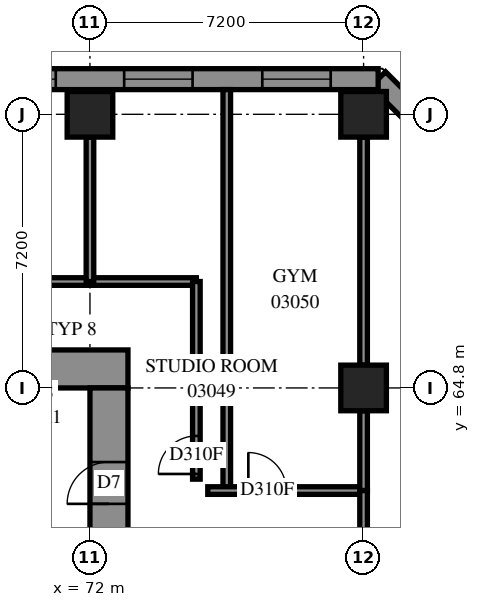
"""IFC4 building model, lengths in metres.
Left out: names, types, materials, properties, quantities, classifications, styles, units other than length and angle.
Written with IfcOpenShell. Run it as: python <this file> out.ifc"""

import sys

from ifc_helpers import new_model, si_unit, direction, frame, frame_2d, origin, origin_2d, place, context, subcontext, project, spatial, polyline, rectangle, outline, extrude, element, fill, save


model = new_model("IFC4")
c1 = context("Model", 3, precision=1e-05, world=origin(), true_north=direction((0.0, 1.0)))
c2 = subcontext(c1, "Body", "Model", "MODEL_VIEW")
j1 = project(units=[si_unit("LENGTHUNIT", "METRE"), si_unit("PLANEANGLEUNIT", "RADIAN")], contexts=[c1])
p1 = place(None, origin())
s1 = spatial("IfcSite", under=j1, at=p1, CompositionType="ELEMENT")
p2 = place(p1, origin())
s2 = spatial("IfcBuilding", under=s1, at=p2, CompositionType="ELEMENT")
p3 = place(p2, frame((0.0, 0.0, 14.4)))
s3 = spatial("IfcBuildingStorey", under=s2, at=p3, CompositionType="ELEMENT", Elevation=14.4)
for number, where, z_axis, x_axis in (
    (1, (72.0, 72.0, 0.0), (0.0, 0.0, 1.0), (1.0, 0.0, 0.0)),
    (2, (79.2, 64.8, 0.0), (0.0, 0.0, 1.0), (1.0, 0.0, 0.0)),
    (3, (79.2, 72.0, 0.0), (0.0, 0.0, 1.0), (1.0, 0.0, 0.0)),
):
    element("IfcColumn", number, at=place(p3, frame(where, z_axis=z_axis, x_axis=x_axis)), inside=s3, PredefinedType="COLUMN", context=c2, shape_type="SweptSolid", body=[
        extrude(rectangle(XDim=1.2, YDim=1.2, at=origin_2d()), origin(), (0.0, 0.0, 1.0), 3.8),
    ])
p4 = place(p3, frame((56.6, 65.3, -0.4), z_axis=(0.0, 0.0, 1.0), x_axis=(1.0, 0.0, 0.0)))
e4 = element("IfcWall", 4, at=p4, inside=s3, PredefinedType="SHEAR", context=c2, shape_type="SweptSolid", body=[
    extrude(rectangle(XDim=16.4, YDim=1.0, at=frame_2d((8.2, 0.0))), origin(), (0.0, 0.0, 1.0), 3.5),
])
p5 = place(p4, frame((11.0, 0.0, 0.4)))
e5 = element("IfcOpeningElement", 5, at=p5, cuts=e4, PredefinedType="OPENING", context=c2, shape_type="SweptSolid", body=[
    extrude(rectangle(XDim=0.8, YDim=2.1, at=frame_2d((0.4, 1.05))), frame((0.0, 0.51, 0.0), z_axis=(0.0, -1.0, 0.0), x_axis=(1.0, 0.0, 0.0)), (0.0, 0.0, 1.0), 1.02),
])
p6 = place(p3, frame((72.5, 50.4, -0.4), z_axis=(0.0, 0.0, 1.0), x_axis=(0.0, 1.0, 0.0)))
e6 = element("IfcWall", 6, at=p6, inside=s3, PredefinedType="SHEAR", context=c2, shape_type="SweptSolid", body=[
    extrude(rectangle(XDim=14.4, YDim=1.0, at=frame_2d((7.2, 0.0))), origin(), (0.0, 0.0, 1.0), 3.5),
])
p7 = place(p6, frame((4.55, 0.0, 0.4)))
e7 = element("IfcOpeningElement", 7, at=p7, cuts=e6, PredefinedType="OPENING", context=c2, shape_type="SweptSolid", body=[
    extrude(rectangle(XDim=1.1, YDim=2.1, at=frame_2d((0.55, 1.05))), frame((0.0, 0.51, 0.0), z_axis=(0.0, -1.0, 0.0), x_axis=(1.0, 0.0, 0.0)), (0.0, 0.0, 1.0), 1.02),
])
p8 = place(p6, frame((11.35, 0.0, 0.4)))
e8 = element("IfcOpeningElement", 8, at=p8, cuts=e6, PredefinedType="OPENING", context=c2, shape_type="SweptSolid", body=[
    extrude(rectangle(XDim=1.1, YDim=2.1, at=frame_2d((0.55, 1.05))), frame((0.0, 0.51, 0.0), z_axis=(0.0, -1.0, 0.0), x_axis=(1.0, 0.0, 0.0)), (0.0, 0.0, 1.0), 1.02),
])
p9 = place(p3, frame((117.843, 34.665, 0.0), z_axis=(0.0, 0.0, 1.0), x_axis=(-0.7071067812, 0.7071067812, 0.0)))
e9 = element("IfcWall", 9, at=p9, inside=s3, PredefinedType="SOLIDWALL", context=c2, shape_type="SweptSolid", body=[
    extrude(outline(polyline([(-0.275, -0.275), (54.222, -0.275), (53.994, 0.275), (0.275, 0.275), (-0.275, -0.275)])), origin(), (0.0, 0.0, 1.0), 3.8),
])
p10 = place(p9, frame((0.8, 0.0, 0.7)))
e10 = element("IfcOpeningElement", 10, at=p10, cuts=e9, PredefinedType="OPENING", context=c2, shape_type="SweptSolid", body=[
    extrude(rectangle(XDim=1.8, YDim=2.6, at=frame_2d((0.9, 1.3))), frame((0.0, 0.285, 0.0), z_axis=(0.0, -1.0, 0.0), x_axis=(1.0, 0.0, 0.0)), (0.0, 0.0, 1.0), 0.57),
])
p11 = place(p9, frame((4.225, 0.0, 0.7)))
e11 = element("IfcOpeningElement", 11, at=p11, cuts=e9, PredefinedType="OPENING", context=c2, shape_type="SweptSolid", body=[
    extrude(rectangle(XDim=1.8, YDim=2.6, at=frame_2d((0.9, 1.3))), frame((0.0, 0.285, 0.0), z_axis=(0.0, -1.0, 0.0), x_axis=(1.0, 0.0, 0.0)), (0.0, 0.0, 1.0), 0.57),
])
p12 = place(p9, frame((7.825, 0.0, 0.7)))
e12 = element("IfcOpeningElement", 12, at=p12, cuts=e9, PredefinedType="OPENING", context=c2, shape_type="SweptSolid", body=[
    extrude(rectangle(XDim=1.8, YDim=2.6, at=frame_2d((0.9, 1.3))), frame((0.0, 0.285, 0.0), z_axis=(0.0, -1.0, 0.0), x_axis=(1.0, 0.0, 0.0)), (0.0, 0.0, 1.0), 0.57),
])
p13 = place(p9, frame((11.425, 0.0, 0.7)))
e13 = element("IfcOpeningElement", 13, at=p13, cuts=e9, PredefinedType="OPENING", context=c2, shape_type="SweptSolid", body=[
    extrude(rectangle(XDim=1.8, YDim=2.6, at=frame_2d((0.9, 1.3))), frame((0.0, 0.285, 0.0), z_axis=(0.0, -1.0, 0.0), x_axis=(1.0, 0.0, 0.0)), (0.0, 0.0, 1.0), 0.57),
])
p14 = place(p9, frame((15.025, 0.0, 0.7)))
e14 = element("IfcOpeningElement", 14, at=p14, cuts=e9, PredefinedType="OPENING", context=c2, shape_type="SweptSolid", body=[
    extrude(rectangle(XDim=1.8, YDim=2.6, at=frame_2d((0.9, 1.3))), frame((0.0, 0.285, 0.0), z_axis=(0.0, -1.0, 0.0), x_axis=(1.0, 0.0, 0.0)), (0.0, 0.0, 1.0), 0.57),
])
p15 = place(p9, frame((18.625, 0.0, 0.7)))
e15 = element("IfcOpeningElement", 15, at=p15, cuts=e9, PredefinedType="OPENING", context=c2, shape_type="SweptSolid", body=[
    extrude(rectangle(XDim=1.8, YDim=2.6, at=frame_2d((0.9, 1.3))), frame((0.0, 0.285, 0.0), z_axis=(0.0, -1.0, 0.0), x_axis=(1.0, 0.0, 0.0)), (0.0, 0.0, 1.0), 0.57),
])
p16 = place(p9, frame((22.225, 0.0, 0.7)))
e16 = element("IfcOpeningElement", 16, at=p16, cuts=e9, PredefinedType="OPENING", context=c2, shape_type="SweptSolid", body=[
    extrude(rectangle(XDim=1.8, YDim=2.6, at=frame_2d((0.9, 1.3))), frame((0.0, 0.285, 0.0), z_axis=(0.0, -1.0, 0.0), x_axis=(1.0, 0.0, 0.0)), (0.0, 0.0, 1.0), 0.57),
])
p17 = place(p9, frame((25.825, 0.0, 0.7)))
e17 = element("IfcOpeningElement", 17, at=p17, cuts=e9, PredefinedType="OPENING", context=c2, shape_type="SweptSolid", body=[
    extrude(rectangle(XDim=1.8, YDim=2.6, at=frame_2d((0.9, 1.3))), frame((0.0, 0.285, 0.0), z_axis=(0.0, -1.0, 0.0), x_axis=(1.0, 0.0, 0.0)), (0.0, 0.0, 1.0), 0.57),
])
p18 = place(p9, frame((29.425, 0.0, 0.7)))
e18 = element("IfcOpeningElement", 18, at=p18, cuts=e9, PredefinedType="OPENING", context=c2, shape_type="SweptSolid", body=[
    extrude(rectangle(XDim=1.8, YDim=2.6, at=frame_2d((0.9, 1.3))), frame((0.0, 0.285, 0.0), z_axis=(0.0, -1.0, 0.0), x_axis=(1.0, 0.0, 0.0)), (0.0, 0.0, 1.0), 0.57),
])
p19 = place(p9, frame((33.025, 0.0, 0.7)))
e19 = element("IfcOpeningElement", 19, at=p19, cuts=e9, PredefinedType="OPENING", context=c2, shape_type="SweptSolid", body=[
    extrude(rectangle(XDim=1.8, YDim=2.6, at=frame_2d((0.9, 1.3))), frame((0.0, 0.285, 0.0), z_axis=(0.0, -1.0, 0.0), x_axis=(1.0, 0.0, 0.0)), (0.0, 0.0, 1.0), 0.57),
])
p20 = place(p9, frame((36.625, 0.0, 0.7)))
e20 = element("IfcOpeningElement", 20, at=p20, cuts=e9, PredefinedType="OPENING", context=c2, shape_type="SweptSolid", body=[
    extrude(rectangle(XDim=1.8, YDim=2.6, at=frame_2d((0.9, 1.3))), frame((0.0, 0.285, 0.0), z_axis=(0.0, -1.0, 0.0), x_axis=(1.0, 0.0, 0.0)), (0.0, 0.0, 1.0), 0.57),
])
p21 = place(p9, frame((40.225, 0.0, 0.7)))
e21 = element("IfcOpeningElement", 21, at=p21, cuts=e9, PredefinedType="OPENING", context=c2, shape_type="SweptSolid", body=[
    extrude(rectangle(XDim=1.8, YDim=2.6, at=frame_2d((0.9, 1.3))), frame((0.0, 0.285, 0.0), z_axis=(0.0, -1.0, 0.0), x_axis=(1.0, 0.0, 0.0)), (0.0, 0.0, 1.0), 0.57),
])
p22 = place(p9, frame((43.825, 0.0, 0.7)))
e22 = element("IfcOpeningElement", 22, at=p22, cuts=e9, PredefinedType="OPENING", context=c2, shape_type="SweptSolid", body=[
    extrude(rectangle(XDim=1.8, YDim=2.6, at=frame_2d((0.9, 1.3))), frame((0.0, 0.285, 0.0), z_axis=(0.0, -1.0, 0.0), x_axis=(1.0, 0.0, 0.0)), (0.0, 0.0, 1.0), 0.57),
])
p23 = place(p9, frame((47.425, 0.0, 0.7)))
e23 = element("IfcOpeningElement", 23, at=p23, cuts=e9, PredefinedType="OPENING", context=c2, shape_type="SweptSolid", body=[
    extrude(rectangle(XDim=1.8, YDim=2.6, at=frame_2d((0.9, 1.3))), frame((0.0, 0.285, 0.0), z_axis=(0.0, -1.0, 0.0), x_axis=(1.0, 0.0, 0.0)), (0.0, 0.0, 1.0), 0.57),
])
p24 = place(p9, frame((51.06, 0.0, 0.7)))
e24 = element("IfcOpeningElement", 24, at=p24, cuts=e9, PredefinedType="OPENING", context=c2, shape_type="SweptSolid", body=[
    extrude(rectangle(XDim=1.8, YDim=2.6, at=frame_2d((0.9, 1.3))), frame((0.0, 0.285, 0.0), z_axis=(0.0, -1.0, 0.0), x_axis=(1.0, 0.0, 0.0)), (0.0, 0.0, 1.0), 0.57),
])
p25 = place(p3, frame((79.583, 72.925, 0.0), z_axis=(0.0, 0.0, 1.0), x_axis=(-1.0, 0.0, 0.0)))
e25 = element("IfcWall", 25, at=p25, inside=s3, PredefinedType="SOLIDWALL", context=c2, shape_type="SweptSolid", body=[
    extrude(outline(polyline([(-0.114, -0.275), (79.583, -0.275), (79.033, 0.275), (0.114, 0.275), (-0.114, -0.275)])), origin(), (0.0, 0.0, 1.0), 3.8),
])
p26 = place(p25, frame((1.249, 0.0, 0.7)))
e26 = element("IfcOpeningElement", 26, at=p26, cuts=e25, PredefinedType="OPENING", context=c2, shape_type="SweptSolid", body=[
    extrude(rectangle(XDim=1.8, YDim=2.6, at=frame_2d((0.9, 1.3))), frame((0.0, 0.285, 0.0), z_axis=(0.0, -1.0, 0.0), x_axis=(1.0, 0.0, 0.0)), (0.0, 0.0, 1.0), 0.57),
])
p27 = place(p25, frame((4.883, 0.0, 0.7)))
e27 = element("IfcOpeningElement", 27, at=p27, cuts=e25, PredefinedType="OPENING", context=c2, shape_type="SweptSolid", body=[
    extrude(rectangle(XDim=1.8, YDim=2.6, at=frame_2d((0.9, 1.3))), frame((0.0, 0.285, 0.0), z_axis=(0.0, -1.0, 0.0), x_axis=(1.0, 0.0, 0.0)), (0.0, 0.0, 1.0), 0.57),
])
p28 = place(p25, frame((8.483, 0.0, 0.7)))
e28 = element("IfcOpeningElement", 28, at=p28, cuts=e25, PredefinedType="OPENING", context=c2, shape_type="SweptSolid", body=[
    extrude(rectangle(XDim=1.8, YDim=2.6, at=frame_2d((0.9, 1.3))), frame((0.0, 0.285, 0.0), z_axis=(0.0, -1.0, 0.0), x_axis=(1.0, 0.0, 0.0)), (0.0, 0.0, 1.0), 0.57),
])
p29 = place(p25, frame((12.083, 0.0, 0.7)))
e29 = element("IfcOpeningElement", 29, at=p29, cuts=e25, PredefinedType="OPENING", context=c2, shape_type="SweptSolid", body=[
    extrude(rectangle(XDim=1.8, YDim=2.6, at=frame_2d((0.9, 1.3))), frame((0.0, 0.285, 0.0), z_axis=(0.0, -1.0, 0.0), x_axis=(1.0, 0.0, 0.0)), (0.0, 0.0, 1.0), 0.57),
])
p30 = place(p25, frame((15.683, 0.0, 0.7)))
e30 = element("IfcOpeningElement", 30, at=p30, cuts=e25, PredefinedType="OPENING", context=c2, shape_type="SweptSolid", body=[
    extrude(rectangle(XDim=1.8, YDim=2.6, at=frame_2d((0.9, 1.3))), frame((0.0, 0.285, 0.0), z_axis=(0.0, -1.0, 0.0), x_axis=(1.0, 0.0, 0.0)), (0.0, 0.0, 1.0), 0.57),
])
p31 = place(p25, frame((19.283, 0.0, 0.7)))
e31 = element("IfcOpeningElement", 31, at=p31, cuts=e25, PredefinedType="OPENING", context=c2, shape_type="SweptSolid", body=[
    extrude(rectangle(XDim=1.8, YDim=2.6, at=frame_2d((0.9, 1.3))), frame((0.0, 0.285, 0.0), z_axis=(0.0, -1.0, 0.0), x_axis=(1.0, 0.0, 0.0)), (0.0, 0.0, 1.0), 0.57),
])
p32 = place(p25, frame((22.883, 0.0, 0.7)))
e32 = element("IfcOpeningElement", 32, at=p32, cuts=e25, PredefinedType="OPENING", context=c2, shape_type="SweptSolid", body=[
    extrude(rectangle(XDim=1.8, YDim=2.6, at=frame_2d((0.9, 1.3))), frame((0.0, 0.285, 0.0), z_axis=(0.0, -1.0, 0.0), x_axis=(1.0, 0.0, 0.0)), (0.0, 0.0, 1.0), 0.57),
])
p33 = place(p25, frame((26.483, 0.0, 0.7)))
e33 = element("IfcOpeningElement", 33, at=p33, cuts=e25, PredefinedType="OPENING", context=c2, shape_type="SweptSolid", body=[
    extrude(rectangle(XDim=1.8, YDim=2.6, at=frame_2d((0.9, 1.3))), frame((0.0, 0.285, 0.0), z_axis=(0.0, -1.0, 0.0), x_axis=(1.0, 0.0, 0.0)), (0.0, 0.0, 1.0), 0.57),
])
p34 = place(p25, frame((30.083, 0.0, 0.7)))
e34 = element("IfcOpeningElement", 34, at=p34, cuts=e25, PredefinedType="OPENING", context=c2, shape_type="SweptSolid", body=[
    extrude(rectangle(XDim=1.8, YDim=2.6, at=frame_2d((0.9, 1.3))), frame((0.0, 0.285, 0.0), z_axis=(0.0, -1.0, 0.0), x_axis=(1.0, 0.0, 0.0)), (0.0, 0.0, 1.0), 0.57),
])
p35 = place(p25, frame((33.683, 0.0, 0.7)))
e35 = element("IfcOpeningElement", 35, at=p35, cuts=e25, PredefinedType="OPENING", context=c2, shape_type="SweptSolid", body=[
    extrude(rectangle(XDim=1.8, YDim=2.6, at=frame_2d((0.9, 1.3))), frame((0.0, 0.285, 0.0), z_axis=(0.0, -1.0, 0.0), x_axis=(1.0, 0.0, 0.0)), (0.0, 0.0, 1.0), 0.57),
])
p36 = place(p25, frame((37.283, 0.0, 0.7)))
e36 = element("IfcOpeningElement", 36, at=p36, cuts=e25, PredefinedType="OPENING", context=c2, shape_type="SweptSolid", body=[
    extrude(rectangle(XDim=1.8, YDim=2.6, at=frame_2d((0.9, 1.3))), frame((0.0, 0.285, 0.0), z_axis=(0.0, -1.0, 0.0), x_axis=(1.0, 0.0, 0.0)), (0.0, 0.0, 1.0), 0.57),
])
p37 = place(p25, frame((40.883, 0.0, 0.7)))
e37 = element("IfcOpeningElement", 37, at=p37, cuts=e25, PredefinedType="OPENING", context=c2, shape_type="SweptSolid", body=[
    extrude(rectangle(XDim=1.8, YDim=2.6, at=frame_2d((0.9, 1.3))), frame((0.0, 0.285, 0.0), z_axis=(0.0, -1.0, 0.0), x_axis=(1.0, 0.0, 0.0)), (0.0, 0.0, 1.0), 0.57),
])
p38 = place(p25, frame((44.483, 0.0, 0.7)))
e38 = element("IfcOpeningElement", 38, at=p38, cuts=e25, PredefinedType="OPENING", context=c2, shape_type="SweptSolid", body=[
    extrude(rectangle(XDim=1.8, YDim=2.6, at=frame_2d((0.9, 1.3))), frame((0.0, 0.285, 0.0), z_axis=(0.0, -1.0, 0.0), x_axis=(1.0, 0.0, 0.0)), (0.0, 0.0, 1.0), 0.57),
])
p39 = place(p25, frame((48.083, 0.0, 0.7)))
e39 = element("IfcOpeningElement", 39, at=p39, cuts=e25, PredefinedType="OPENING", context=c2, shape_type="SweptSolid", body=[
    extrude(rectangle(XDim=1.8, YDim=2.6, at=frame_2d((0.9, 1.3))), frame((0.0, 0.285, 0.0), z_axis=(0.0, -1.0, 0.0), x_axis=(1.0, 0.0, 0.0)), (0.0, 0.0, 1.0), 0.57),
])
p40 = place(p25, frame((51.683, 0.0, 0.7)))
e40 = element("IfcOpeningElement", 40, at=p40, cuts=e25, PredefinedType="OPENING", context=c2, shape_type="SweptSolid", body=[
    extrude(rectangle(XDim=1.8, YDim=2.6, at=frame_2d((0.9, 1.3))), frame((0.0, 0.285, 0.0), z_axis=(0.0, -1.0, 0.0), x_axis=(1.0, 0.0, 0.0)), (0.0, 0.0, 1.0), 0.57),
])
p41 = place(p25, frame((55.283, 0.0, 0.7)))
e41 = element("IfcOpeningElement", 41, at=p41, cuts=e25, PredefinedType="OPENING", context=c2, shape_type="SweptSolid", body=[
    extrude(rectangle(XDim=1.8, YDim=2.6, at=frame_2d((0.9, 1.3))), frame((0.0, 0.285, 0.0), z_axis=(0.0, -1.0, 0.0), x_axis=(1.0, 0.0, 0.0)), (0.0, 0.0, 1.0), 0.57),
])
p42 = place(p25, frame((58.883, 0.0, 0.7)))
e42 = element("IfcOpeningElement", 42, at=p42, cuts=e25, PredefinedType="OPENING", context=c2, shape_type="SweptSolid", body=[
    extrude(rectangle(XDim=1.8, YDim=2.6, at=frame_2d((0.9, 1.3))), frame((0.0, 0.285, 0.0), z_axis=(0.0, -1.0, 0.0), x_axis=(1.0, 0.0, 0.0)), (0.0, 0.0, 1.0), 0.57),
])
p43 = place(p25, frame((62.483, 0.0, 0.7)))
e43 = element("IfcOpeningElement", 43, at=p43, cuts=e25, PredefinedType="OPENING", context=c2, shape_type="SweptSolid", body=[
    extrude(rectangle(XDim=1.8, YDim=2.6, at=frame_2d((0.9, 1.3))), frame((0.0, 0.285, 0.0), z_axis=(0.0, -1.0, 0.0), x_axis=(1.0, 0.0, 0.0)), (0.0, 0.0, 1.0), 0.57),
])
p44 = place(p25, frame((66.083, 0.0, 0.7)))
e44 = element("IfcOpeningElement", 44, at=p44, cuts=e25, PredefinedType="OPENING", context=c2, shape_type="SweptSolid", body=[
    extrude(rectangle(XDim=1.8, YDim=2.6, at=frame_2d((0.9, 1.3))), frame((0.0, 0.285, 0.0), z_axis=(0.0, -1.0, 0.0), x_axis=(1.0, 0.0, 0.0)), (0.0, 0.0, 1.0), 0.57),
])
p45 = place(p25, frame((69.683, 0.0, 0.7)))
e45 = element("IfcOpeningElement", 45, at=p45, cuts=e25, PredefinedType="OPENING", context=c2, shape_type="SweptSolid", body=[
    extrude(rectangle(XDim=1.8, YDim=2.6, at=frame_2d((0.9, 1.3))), frame((0.0, 0.285, 0.0), z_axis=(0.0, -1.0, 0.0), x_axis=(1.0, 0.0, 0.0)), (0.0, 0.0, 1.0), 0.57),
])
p46 = place(p25, frame((73.683, 0.0, 0.7)))
e46 = element("IfcOpeningElement", 46, at=p46, cuts=e25, PredefinedType="OPENING", context=c2, shape_type="SweptSolid", body=[
    extrude(rectangle(XDim=1.8, YDim=2.6, at=frame_2d((0.9, 1.3))), frame((0.0, 0.285, 0.0), z_axis=(0.0, -1.0, 0.0), x_axis=(1.0, 0.0, 0.0)), (0.0, 0.0, 1.0), 0.57),
])
p47 = place(p25, frame((76.508, 0.0, 0.7)))
e47 = element("IfcOpeningElement", 47, at=p47, cuts=e25, PredefinedType="OPENING", context=c2, shape_type="SweptSolid", body=[
    extrude(rectangle(XDim=1.8, YDim=2.6, at=frame_2d((0.9, 1.3))), frame((0.0, 0.285, 0.0), z_axis=(0.0, -1.0, 0.0), x_axis=(1.0, 0.0, 0.0)), (0.0, 0.0, 1.0), 0.57),
])
p48 = place(p3, frame((54.8, 67.6, 0.0), z_axis=(0.0, 0.0, 1.0), x_axis=(1.0, 0.0, 0.0)))
e48 = element("IfcWall", 48, at=p48, inside=s3, PredefinedType="PARTITIONING", context=c2, shape_type="SweptSolid", body=[
    extrude(rectangle(XDim=20.0, YDim=0.2, at=frame_2d((10.0, 0.0))), origin(), (0.0, 0.0, 1.0), 3.8),
])
p49 = place(p48, frame((6.662, 0.0, 0.0)))
e49 = element("IfcOpeningElement", 49, at=p49, cuts=e48, PredefinedType="OPENING", context=c2, shape_type="SweptSolid", body=[
    extrude(rectangle(XDim=1.0, YDim=2.1, at=frame_2d((0.5, 1.05))), frame((0.0, 0.11, 0.0), z_axis=(0.0, -1.0, 0.0), x_axis=(1.0, 0.0, 0.0)), (0.0, 0.0, 1.0), 0.22),
])
p50 = place(p48, frame((13.863, 0.0, 0.0)))
e50 = element("IfcOpeningElement", 50, at=p50, cuts=e48, PredefinedType="OPENING", context=c2, shape_type="SweptSolid", body=[
    extrude(rectangle(XDim=1.0, YDim=2.1, at=frame_2d((0.5, 1.05))), frame((0.0, 0.11, 0.0), z_axis=(0.0, -1.0, 0.0), x_axis=(1.0, 0.0, 0.0)), (0.0, 0.0, 1.0), 0.22),
])
p51 = place(p3, frame((75.6, 62.1, 0.0), z_axis=(0.0, 0.0, 1.0), x_axis=(0.0, 1.0, 0.0)))
e51 = element("IfcWall", 51, at=p51, inside=s3, PredefinedType="PARTITIONING", context=c2, shape_type="SweptSolid", body=[
    extrude(rectangle(XDim=10.55, YDim=0.2, at=frame_2d((5.275, 0.0))), origin(), (0.0, 0.0, 1.0), 3.8),
])
p52 = place(p3, frame((79.2, 65.4, 0.0), z_axis=(0.0, 0.0, 1.0), x_axis=(0.0, 1.0, 0.0)))
e52 = element("IfcWall", 52, at=p52, inside=s3, PredefinedType="PARTITIONING", context=c2, shape_type="SweptSolid", body=[
    extrude(rectangle(XDim=6.0, YDim=0.2, at=frame_2d((3.0, 0.0))), origin(), (0.0, 0.0, 1.0), 3.8),
])
p53 = place(p3, frame((74.8, 62.4, 0.0), z_axis=(0.0, 0.0, 1.0), x_axis=(0.0, 1.0, 0.0)))
e53 = element("IfcWall", 53, at=p53, inside=s3, PredefinedType="PARTITIONING", context=c2, shape_type="SweptSolid", body=[
    extrude(rectangle(XDim=5.2, YDim=0.2, at=frame_2d((2.6, 0.0))), origin(), (0.0, 0.0, 1.0), 3.8),
])
p54 = place(p53, frame((0.137, 0.0, 0.0)))
e54 = element("IfcOpeningElement", 54, at=p54, cuts=e53, PredefinedType="OPENING", context=c2, shape_type="SweptSolid", body=[
    extrude(rectangle(XDim=1.0, YDim=2.1, at=frame_2d((0.5, 1.05))), frame((0.0, 0.11, 0.0), z_axis=(0.0, -1.0, 0.0), x_axis=(1.0, 0.0, 0.0)), (0.0, 0.0, 1.0), 0.22),
])
p55 = place(p3, frame((75.1, 62.1, 0.0), z_axis=(0.0, 0.0, 1.0), x_axis=(1.0, 0.0, 0.0)))
e55 = element("IfcWall", 55, at=p55, inside=s3, PredefinedType="PARTITIONING", context=c2, shape_type="SweptSolid", body=[
    extrude(rectangle(XDim=4.1, YDim=0.2, at=frame_2d((2.05, 0.0))), origin(), (0.0, 0.0, 1.0), 3.8),
])
p56 = place(p55, frame((1.067, 0.0, 0.0)))
e56 = element("IfcOpeningElement", 56, at=p56, cuts=e55, PredefinedType="OPENING", context=c2, shape_type="SweptSolid", body=[
    extrude(rectangle(XDim=1.0, YDim=2.1, at=frame_2d((0.5, 1.05))), frame((0.0, 0.11, 0.0), z_axis=(0.0, -1.0, 0.0), x_axis=(1.0, 0.0, 0.0)), (0.0, 0.0, 1.0), 0.22),
])
p57 = place(p3, frame((72.0, 67.6, 0.0), z_axis=(0.0, 0.0, 1.0), x_axis=(0.0, 1.0, 0.0)))
e57 = element("IfcWall", 57, at=p57, inside=s3, PredefinedType="PARTITIONING", context=c2, shape_type="SweptSolid", body=[
    extrude(rectangle(XDim=3.8, YDim=0.2, at=frame_2d((1.9, 0.0))), origin(), (0.0, 0.0, 1.0), 3.8),
])
p58 = place(p3, frame((79.2, 62.1, 0.0), z_axis=(0.0, 0.0, 1.0), x_axis=(0.0, 1.0, 0.0)))
e58 = element("IfcWall", 58, at=p58, inside=s3, PredefinedType="PARTITIONING", context=c2, shape_type="SweptSolid", body=[
    extrude(rectangle(XDim=2.1, YDim=0.2, at=frame_2d((1.05, 0.0))), origin(), (0.0, 0.0, 1.0), 3.8),
])
p59 = place(p3, frame((79.2, 60.3, 0.0), z_axis=(0.0, 0.0, 1.0), x_axis=(0.0, 1.0, 0.0)))
e59 = element("IfcWall", 59, at=p59, inside=s3, PredefinedType="PARTITIONING", context=c2, shape_type="SweptSolid", body=[
    extrude(rectangle(XDim=1.8, YDim=0.2, at=frame_2d((0.9, 0.0))), origin(), (0.0, 0.0, 1.0), 3.8),
])
p60 = place(p26, origin())
e60 = element("IfcWindow", 60, at=p60, inside=s3, PartitioningType="SINGLE_PANEL", PredefinedType="WINDOW", context=c2, shape_type="SweptSolid", body=[
    extrude(rectangle(XDim=1.8, YDim=2.6, at=frame_2d((0.9, 1.3))), frame((0.0, 0.155, 0.0), z_axis=(0.0, -1.0, 0.0), x_axis=(1.0, 0.0, 0.0)), (0.0, 0.0, 1.0), 0.06),
])
fill(e26, e60)
p61 = place(p27, origin())
e61 = element("IfcWindow", 61, at=p61, inside=s3, PartitioningType="SINGLE_PANEL", PredefinedType="WINDOW", context=c2, shape_type="SweptSolid", body=[
    extrude(rectangle(XDim=1.8, YDim=2.6, at=frame_2d((0.9, 1.3))), frame((0.0, 0.155, 0.0), z_axis=(0.0, -1.0, 0.0), x_axis=(1.0, 0.0, 0.0)), (0.0, 0.0, 1.0), 0.06),
])
fill(e27, e61)
p62 = place(p28, origin())
e62 = element("IfcWindow", 62, at=p62, inside=s3, PartitioningType="SINGLE_PANEL", PredefinedType="WINDOW", context=c2, shape_type="SweptSolid", body=[
    extrude(rectangle(XDim=1.8, YDim=2.6, at=frame_2d((0.9, 1.3))), frame((0.0, 0.155, 0.0), z_axis=(0.0, -1.0, 0.0), x_axis=(1.0, 0.0, 0.0)), (0.0, 0.0, 1.0), 0.06),
])
fill(e28, e62)
p63 = place(p8, origin())
e63 = element("IfcDoor", 63, at=p63, inside=s3, OperationType="SINGLE_SWING_RIGHT", PredefinedType="DOOR", context=c2, shape_type="SweptSolid", body=[
    extrude(rectangle(XDim=1.1, YDim=2.1, at=frame_2d((0.55, 1.05))), frame((0.0, 0.025, 0.0), z_axis=(0.0, -1.0, 0.0), x_axis=(1.0, 0.0, 0.0)), (0.0, 0.0, 1.0), 0.05),
])
fill(e8, e63)
p64 = place(p54, origin())
e64 = element("IfcDoor", 64, at=p64, inside=s3, OperationType="SINGLE_SWING_RIGHT", PredefinedType="DOOR", context=c2, shape_type="SweptSolid", body=[
    extrude(rectangle(XDim=1.0, YDim=2.1, at=frame_2d((0.5, 1.05))), frame((0.0, 0.025, 0.0), z_axis=(0.0, -1.0, 0.0), x_axis=(1.0, 0.0, 0.0)), (0.0, 0.0, 1.0), 0.05),
])
fill(e54, e64)
p65 = place(p56, origin())
e65 = element("IfcDoor", 65, at=p65, inside=s3, OperationType="SINGLE_SWING_LEFT", PredefinedType="DOOR", context=c2, shape_type="SweptSolid", body=[
    extrude(rectangle(XDim=1.0, YDim=2.1, at=frame_2d((0.5, 1.05))), frame((0.0, 0.025, 0.0), z_axis=(0.0, -1.0, 0.0), x_axis=(1.0, 0.0, 0.0)), (0.0, 0.0, 1.0), 0.05),
])
fill(e56, e65)
save(model, sys.argv[1])
